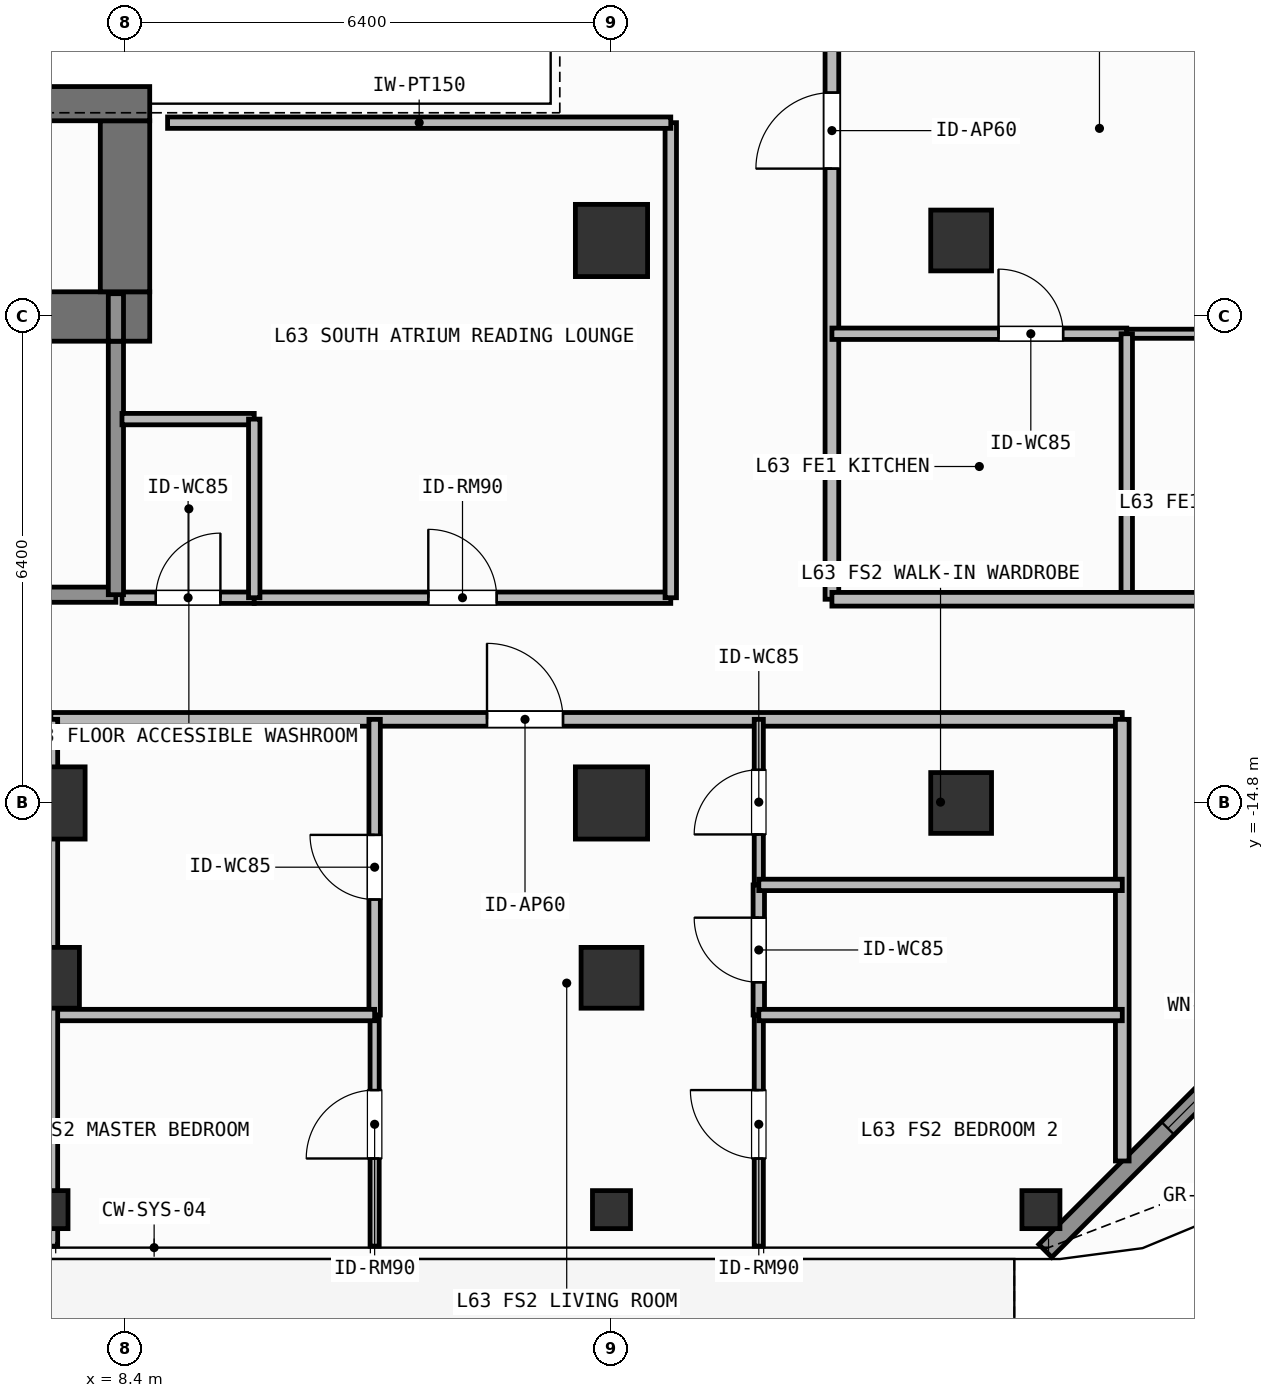
"""IFC4 building model, lengths in metres.
Left out: names, types, materials, properties, quantities, classifications, styles, units other than length and angle.
Written with IfcOpenShell. Run it as: python <this file> out.ifc"""

import sys

from ifc_helpers import new_model, si_unit, direction, frame, frame_2d, origin, origin_2d, place, context, subcontext, project, spatial, rectangle, hollow_rectangle, extrude, element, fill, save


model = new_model("IFC4")
c1 = context("Model", 3, precision=1e-05, world=origin(), true_north=direction((0.0, 1.0)))
c2 = subcontext(c1, "Body", "Model", "MODEL_VIEW")
j1 = project(units=[si_unit("LENGTHUNIT", "METRE"), si_unit("PLANEANGLEUNIT", "RADIAN")], contexts=[c1])
p1 = place(None, origin())
s1 = spatial("IfcSite", under=j1, at=p1, CompositionType="ELEMENT")
p2 = place(p1, origin())
s2 = spatial("IfcBuilding", under=s1, at=p2, CompositionType="ELEMENT")
p3 = place(p2, frame((0.0, 0.0, 258.6)))
s3 = spatial("IfcBuildingStorey", under=s2, at=p3, CompositionType="ELEMENT", Elevation=258.6)
p4 = place(p3, frame((6.12, -8.4, 0.0), z_axis=(0.0, 0.0, 1.0), x_axis=(1.0, 0.0, 0.0)))
e1 = element("IfcWall", 1, at=p4, inside=s3, PredefinedType="SHEAR", context=c2, shape_type="SweptSolid", body=[
    extrude(rectangle(XDim=2.605, YDim=0.65, at=frame_2d((1.302, 0.0))), origin(), (0.0, 0.0, 1.0), 3.9),
])
p5 = place(p3, frame((8.4, -8.075, 0.0), z_axis=(0.0, 0.0, 1.0), x_axis=(0.0, 1.0, 0.0)))
e2 = element("IfcWall", 2, at=p5, inside=s3, PredefinedType="SHEAR", context=c2, shape_type="SweptSolid", body=[
    extrude(rectangle(XDim=2.25, YDim=0.65, at=frame_2d((1.125, 0.0))), origin(), (0.0, 0.0, 1.0), 3.9),
])
p6 = place(p3, frame((3.045, -5.6, 0.0), z_axis=(0.0, 0.0, 1.0), x_axis=(1.0, 0.0, 0.0)))
e3 = element("IfcWall", 3, at=p6, inside=s3, PredefinedType="SHEAR", context=c2, shape_type="SweptSolid", body=[
    extrude(rectangle(XDim=5.68, YDim=0.45, at=frame_2d((2.84, 0.0))), origin(), (0.0, 0.0, 1.0), 3.9),
])
for number, where, z_axis, x_axis in (
    (4, (7.4, -14.8, 0.0), (0.0, 0.0, 1.0), (1.0, 0.0, 0.0)),
    (5, (14.8, -14.8, 0.0), (0.0, 0.0, 1.0), (1.0, 0.0, 0.0)),
    (6, (14.8, -7.4, 0.0), (0.0, 0.0, 1.0), (1.0, 0.0, 0.0)),
):
    element("IfcColumn", number, at=place(p3, frame(where, z_axis=z_axis, x_axis=x_axis)), inside=s3, PredefinedType="COLUMN", context=c2, shape_type="SweptSolid", body=[
        extrude(rectangle(XDim=0.95, YDim=0.95, at=origin_2d()), origin(), (0.0, 0.0, 1.0), 3.9),
    ])
for number, where, z_axis, x_axis in (
    (7, (19.4, -14.8, 0.0), (0.0, 0.0, 1.0), (1.0, 0.0, 0.0)),
    (8, (19.4, -7.4, 0.0), (0.0, 0.0, 1.0), (1.0, 0.0, 0.0)),
    (9, (7.4, -17.1, 0.0), (0.0, 0.0, 1.0), (1.0, 0.0, 0.0)),
    (10, (14.8, -17.1, 0.0), (0.0, 0.0, 1.0), (1.0, 0.0, 0.0)),
):
    element("IfcColumn", number, at=place(p3, frame(where, z_axis=z_axis, x_axis=x_axis)), inside=s3, PredefinedType="COLUMN", context=c2, shape_type="SweptSolid", body=[
        extrude(hollow_rectangle(XDim=0.8, YDim=0.8, WallThickness=0.036, at=origin_2d()), origin(), (0.0, 0.0, 1.0), 3.9),
    ])
for number, where, z_axis, x_axis in (
    (11, (20.45, -20.15, 0.0), (0.0, 0.0, 1.0), (1.0, 0.0, 0.0)),
    (12, (7.4, -20.15, 0.0), (0.0, 0.0, 1.0), (1.0, 0.0, 0.0)),
    (13, (14.8, -20.15, 0.0), (0.0, 0.0, 1.0), (1.0, 0.0, 0.0)),
):
    element("IfcColumn", number, at=place(p3, frame(where, z_axis=z_axis, x_axis=x_axis)), inside=s3, PredefinedType="COLUMN", context=c2, shape_type="SweptSolid", body=[
        extrude(hollow_rectangle(XDim=0.5, YDim=0.5, WallThickness=0.025, at=origin_2d()), origin(), (0.0, 0.0, 1.0), 3.9),
    ])
p7 = place(p3, frame((24.792, -16.408, 0.0), z_axis=(0.0, 0.0, 1.0), x_axis=(-0.707126925818, -0.707086635981, 0.0)))
e14 = element("IfcWall", 14, at=p7, inside=s3, PredefinedType="SOLIDWALL", context=c2, shape_type="SweptSolid", body=[
    extrude(rectangle(XDim=6.06, YDim=0.24, at=frame_2d((3.03, 0.0))), origin(), (0.0, 0.0, 1.0), 3.68),
])
p8 = place(p7, frame((2.28, 0.0, 0.8)))
e15 = element("IfcOpeningElement", 15, at=p8, cuts=e14, PredefinedType="OPENING", context=c2, shape_type="SweptSolid", body=[
    extrude(rectangle(XDim=1.5, YDim=1.85, at=frame_2d((0.75, 0.925))), frame((0.0, 0.13, 0.0), z_axis=(0.0, -1.0, 0.0), x_axis=(1.0, 0.0, 0.0)), (0.0, 0.0, 1.0), 0.26),
])
p9 = place(p3, frame((4.58, -12.06, 0.0), z_axis=(0.0, 0.0, 1.0), x_axis=(1.0, 0.0, 0.0)))
e16 = element("IfcWall", 16, at=p9, inside=s3, PredefinedType="SOLIDWALL", context=c2, shape_type="SweptSolid", body=[
    extrude(rectangle(XDim=3.7, YDim=0.2, at=frame_2d((1.85, 0.0))), origin(), (0.0, 0.0, 1.0), 3.68),
])
p10 = place(p9, frame((1.212, 0.0, 0.0)))
e17 = element("IfcOpeningElement", 17, at=p10, cuts=e16, PredefinedType="OPENING", context=c2, shape_type="SweptSolid", body=[
    extrude(rectangle(XDim=1.1, YDim=2.15, at=frame_2d((0.55, 1.075))), frame((0.0, 0.11, 0.0), z_axis=(0.0, -1.0, 0.0), x_axis=(1.0, 0.0, 0.0)), (0.0, 0.0, 1.0), 0.22),
])
p11 = place(p3, frame((8.36, -12.1, 0.0), z_axis=(0.0, 0.0, 1.0), x_axis=(1.0, 0.0, 0.0)))
e18 = element("IfcWall", 18, at=p11, inside=s3, PredefinedType="PARTITIONING", context=c2, shape_type="SweptSolid", body=[
    extrude(rectangle(XDim=1.74, YDim=0.15, at=frame_2d((0.87, 0.0))), origin(), (0.0, 0.0, 1.0), 3.68),
])
p12 = place(p11, frame((0.445, 0.0, 0.0)))
e19 = element("IfcOpeningElement", 19, at=p12, cuts=e18, PredefinedType="OPENING", context=c2, shape_type="SweptSolid", body=[
    extrude(rectangle(XDim=0.85, YDim=2.1, at=frame_2d((0.425, 1.05))), frame((0.0, 0.085, 0.0), z_axis=(0.0, -1.0, 0.0), x_axis=(1.0, 0.0, 0.0)), (0.0, 0.0, 1.0), 0.17),
])
p13 = place(p3, frame((10.1, -12.1, 0.0), z_axis=(0.0, 0.0, 1.0), x_axis=(1.0, 0.0, 0.0)))
e20 = element("IfcWall", 20, at=p13, inside=s3, PredefinedType="PARTITIONING", context=c2, shape_type="SweptSolid", body=[
    extrude(rectangle(XDim=5.48, YDim=0.15, at=frame_2d((2.74, 0.0))), origin(), (0.0, 0.0, 1.0), 3.68),
])
p14 = place(p13, frame((2.29, 0.0, 0.0)))
e21 = element("IfcOpeningElement", 21, at=p14, cuts=e20, PredefinedType="OPENING", context=c2, shape_type="SweptSolid", body=[
    extrude(rectangle(XDim=0.9, YDim=2.1, at=frame_2d((0.45, 1.05))), frame((0.0, 0.085, 0.0), z_axis=(0.0, -1.0, 0.0), x_axis=(1.0, 0.0, 0.0)), (0.0, 0.0, 1.0), 0.17),
])
p15 = place(p3, frame((7.424, -13.7, 0.0), z_axis=(0.0, 0.0, 1.0), x_axis=(1.0, 0.0, 0.0)))
e22 = element("IfcWall", 22, at=p15, inside=s3, PredefinedType="PARTITIONING", context=c2, shape_type="SweptSolid", body=[
    extrude(rectangle(XDim=14.096, YDim=0.18, at=frame_2d((7.048, 0.0))), origin(), (0.0, 0.0, 1.0), 3.68),
])
p16 = place(p15, frame((5.738, 0.0, 0.0)))
e23 = element("IfcOpeningElement", 23, at=p16, cuts=e22, PredefinedType="OPENING", context=c2, shape_type="SweptSolid", body=[
    extrude(rectangle(XDim=1.0, YDim=2.2, at=frame_2d((0.5, 1.1))), frame((0.0, 0.1, 0.0), z_axis=(0.0, -1.0, 0.0), x_axis=(1.0, 0.0, 0.0)), (0.0, 0.0, 1.0), 0.2),
])
p17 = place(p3, frame((11.684, -17.59, 0.0), z_axis=(0.0, 0.0, 1.0), x_axis=(0.0, 1.0, 0.0)))
e24 = element("IfcWall", 24, at=p17, inside=s3, PredefinedType="PARTITIONING", context=c2, shape_type="SweptSolid", body=[
    extrude(rectangle(XDim=3.89, YDim=0.15, at=frame_2d((1.945, 0.0))), origin(), (0.0, 0.0, 1.0), 3.68),
])
p18 = place(p17, frame((1.52, 0.0, 0.0)))
e25 = element("IfcOpeningElement", 25, at=p18, cuts=e24, PredefinedType="OPENING", context=c2, shape_type="SweptSolid", body=[
    extrude(rectangle(XDim=0.85, YDim=2.1, at=frame_2d((0.425, 1.05))), frame((0.0, 0.085, 0.0), z_axis=(0.0, -1.0, 0.0), x_axis=(1.0, 0.0, 0.0)), (0.0, 0.0, 1.0), 0.17),
])
p19 = place(p3, frame((11.684, -20.63, 0.0), z_axis=(0.0, 0.0, 1.0), x_axis=(0.0, 1.0, 0.0)))
e26 = element("IfcWall", 26, at=p19, inside=s3, PredefinedType="PARTITIONING", context=c2, shape_type="SweptSolid", body=[
    extrude(rectangle(XDim=3.04, YDim=0.12, at=frame_2d((1.52, 0.0))), origin(), (0.0, 0.0, 1.0), 3.68),
])
p20 = place(p19, frame((1.153, 0.0, 0.0)))
e27 = element("IfcOpeningElement", 27, at=p20, cuts=e26, PredefinedType="OPENING", context=c2, shape_type="SweptSolid", body=[
    extrude(rectangle(XDim=0.9, YDim=2.1, at=frame_2d((0.45, 1.05))), frame((0.0, 0.07, 0.0), z_axis=(0.0, -1.0, 0.0), x_axis=(1.0, 0.0, 0.0)), (0.0, 0.0, 1.0), 0.14),
])
p21 = place(p3, frame((16.738, -17.59, 0.0), z_axis=(0.0, 0.0, 1.0), x_axis=(0.0, 1.0, 0.0)))
e28 = element("IfcWall", 28, at=p21, inside=s3, PredefinedType="PARTITIONING", context=c2, shape_type="SweptSolid", body=[
    extrude(rectangle(XDim=1.712, YDim=0.15, at=frame_2d((0.856, 0.0))), origin(), (0.0, 0.0, 1.0), 3.68),
])
p22 = place(p21, frame((0.431, 0.0, 0.0)))
e29 = element("IfcOpeningElement", 29, at=p22, cuts=e28, PredefinedType="OPENING", context=c2, shape_type="SweptSolid", body=[
    extrude(rectangle(XDim=0.85, YDim=2.1, at=frame_2d((0.425, 1.05))), frame((0.0, 0.085, 0.0), z_axis=(0.0, -1.0, 0.0), x_axis=(1.0, 0.0, 0.0)), (0.0, 0.0, 1.0), 0.17),
])
p23 = place(p3, frame((16.738, -15.878, 0.0), z_axis=(0.0, 0.0, 1.0), x_axis=(0.0, 1.0, 0.0)))
e30 = element("IfcWall", 30, at=p23, inside=s3, PredefinedType="PARTITIONING", context=c2, shape_type="SweptSolid", body=[
    extrude(rectangle(XDim=2.178, YDim=0.12, at=frame_2d((1.089, 0.0))), origin(), (0.0, 0.0, 1.0), 3.68),
])
p24 = place(p23, frame((0.664, 0.0, 0.0)))
e31 = element("IfcOpeningElement", 31, at=p24, cuts=e30, PredefinedType="OPENING", context=c2, shape_type="SweptSolid", body=[
    extrude(rectangle(XDim=0.85, YDim=2.1, at=frame_2d((0.425, 1.05))), frame((0.0, 0.07, 0.0), z_axis=(0.0, -1.0, 0.0), x_axis=(1.0, 0.0, 0.0)), (0.0, 0.0, 1.0), 0.14),
])
p25 = place(p3, frame((16.738, -20.63, 0.0), z_axis=(0.0, 0.0, 1.0), x_axis=(0.0, 1.0, 0.0)))
e32 = element("IfcWall", 32, at=p25, inside=s3, PredefinedType="PARTITIONING", context=c2, shape_type="SweptSolid", body=[
    extrude(rectangle(XDim=3.04, YDim=0.12, at=frame_2d((1.52, 0.0))), origin(), (0.0, 0.0, 1.0), 3.68),
])
p26 = place(p25, frame((1.153, 0.0, 0.0)))
e33 = element("IfcOpeningElement", 33, at=p26, cuts=e32, PredefinedType="OPENING", context=c2, shape_type="SweptSolid", body=[
    extrude(rectangle(XDim=0.9, YDim=2.1, at=frame_2d((0.45, 1.05))), frame((0.0, 0.07, 0.0), z_axis=(0.0, -1.0, 0.0), x_axis=(1.0, 0.0, 0.0)), (0.0, 0.0, 1.0), 0.14),
])
p27 = place(p3, frame((17.7, -12.12, 0.0), z_axis=(0.0, 0.0, 1.0), x_axis=(0.0, 1.0, 0.0)))
e34 = element("IfcWall", 34, at=p27, inside=s3, PredefinedType="PARTITIONING", context=c2, shape_type="SweptSolid", body=[
    extrude(rectangle(XDim=13.574, YDim=0.18, at=frame_2d((6.787, 0.0))), origin(), (0.0, 0.0, 1.0), 3.68),
])
p28 = place(p27, frame((5.665, 0.0, 0.0)))
e35 = element("IfcOpeningElement", 35, at=p28, cuts=e34, PredefinedType="OPENING", context=c2, shape_type="SweptSolid", body=[
    extrude(rectangle(XDim=1.0, YDim=2.2, at=frame_2d((0.5, 1.1))), frame((0.0, 0.1, 0.0), z_axis=(0.0, -1.0, 0.0), x_axis=(1.0, 0.0, 0.0)), (0.0, 0.0, 1.0), 0.2),
])
p29 = place(p3, frame((17.7, -8.627, 0.0), z_axis=(0.0, 0.0, 1.0), x_axis=(1.0, 0.0, 0.0)))
e36 = element("IfcWall", 36, at=p29, inside=s3, PredefinedType="PARTITIONING", context=c2, shape_type="SweptSolid", body=[
    extrude(rectangle(XDim=3.879, YDim=0.15, at=frame_2d((1.939, 0.0))), origin(), (0.0, 0.0, 1.0), 3.68),
])
p30 = place(p29, frame((2.192, 0.0, 0.0)))
e37 = element("IfcOpeningElement", 37, at=p30, cuts=e36, PredefinedType="OPENING", context=c2, shape_type="SweptSolid", body=[
    extrude(rectangle(XDim=0.85, YDim=2.1, at=frame_2d((0.425, 1.05))), frame((0.0, 0.085, 0.0), z_axis=(0.0, -1.0, 0.0), x_axis=(1.0, 0.0, 0.0)), (0.0, 0.0, 1.0), 0.17),
])
p31 = place(p3, frame((21.579, -8.627, 0.0), z_axis=(0.0, 0.0, 1.0), x_axis=(1.0, 0.0, 0.0)))
e38 = element("IfcWall", 38, at=p31, inside=s3, PredefinedType="PARTITIONING", context=c2, shape_type="SweptSolid", body=[
    extrude(rectangle(XDim=3.151, YDim=0.12, at=frame_2d((1.575, 0.0))), origin(), (0.0, 0.0, 1.0), 3.68),
])
p32 = place(p31, frame((1.213, 0.0, 0.0)))
e39 = element("IfcOpeningElement", 39, at=p32, cuts=e38, PredefinedType="OPENING", context=c2, shape_type="SweptSolid", body=[
    extrude(rectangle(XDim=0.9, YDim=2.1, at=frame_2d((0.45, 1.05))), frame((0.0, 0.07, 0.0), z_axis=(0.0, -1.0, 0.0), x_axis=(1.0, 0.0, 0.0)), (0.0, 0.0, 1.0), 0.14),
])
p33 = place(p3, frame((8.28, -12.06, 0.0), z_axis=(0.0, 0.0, 1.0), x_axis=(0.0, 1.0, 0.0)))
e40 = element("IfcWall", 40, at=p33, inside=s3, PredefinedType="SOLIDWALL", context=c2, shape_type="SweptSolid", body=[
    extrude(rectangle(XDim=3.335, YDim=0.2, at=frame_2d((1.667, 0.0))), origin(), (0.0, 0.0, 1.0), 3.68),
])
p34 = place(p3, frame((8.28, -8.725, 0.0), z_axis=(0.0, 0.0, 1.0), x_axis=(0.0, 1.0, 0.0)))
e41 = element("IfcWall", 41, at=p34, inside=s3, PredefinedType="SOLIDWALL", context=c2, shape_type="SweptSolid", body=[
    extrude(rectangle(XDim=0.625, YDim=0.2, at=frame_2d((0.312, 0.0))), origin(), (0.0, 0.0, 1.0), 3.68),
])
p35 = place(p3, frame((8.36, -9.75, 0.0), z_axis=(0.0, 0.0, 1.0), x_axis=(1.0, 0.0, 0.0)))
e42 = element("IfcWall", 42, at=p35, inside=s3, PredefinedType="PARTITIONING", context=c2, shape_type="SweptSolid", body=[
    extrude(rectangle(XDim=1.74, YDim=0.15, at=frame_2d((0.87, 0.0))), origin(), (0.0, 0.0, 1.0), 3.68),
])
p36 = place(p3, frame((10.1, -12.1, 0.0), z_axis=(0.0, 0.0, 1.0), x_axis=(0.0, 1.0, 0.0)))
e43 = element("IfcWall", 43, at=p36, inside=s3, PredefinedType="PARTITIONING", context=c2, shape_type="SweptSolid", body=[
    extrude(rectangle(XDim=2.35, YDim=0.15, at=frame_2d((1.175, 0.0))), origin(), (0.0, 0.0, 1.0), 3.68),
])
p37 = place(p3, frame((15.58, -12.1, 0.0), z_axis=(0.0, 0.0, 1.0), x_axis=(0.0, 1.0, 0.0)))
e44 = element("IfcWall", 44, at=p37, inside=s3, PredefinedType="PARTITIONING", context=c2, shape_type="SweptSolid", body=[
    extrude(rectangle(XDim=6.25, YDim=0.15, at=frame_2d((3.125, 0.0))), origin(), (0.0, 0.0, 1.0), 3.68),
])
p38 = place(p3, frame((8.96, -5.85, 0.0), z_axis=(0.0, 0.0, 1.0), x_axis=(1.0, 0.0, 0.0)))
e45 = element("IfcWall", 45, at=p38, inside=s3, PredefinedType="PARTITIONING", context=c2, shape_type="SweptSolid", body=[
    extrude(rectangle(XDim=6.62, YDim=0.15, at=frame_2d((3.31, 0.0))), origin(), (0.0, 0.0, 1.0), 3.68),
])
p39 = place(p3, frame((21.52, -19.51, 0.0), z_axis=(0.0, 0.0, 1.0), x_axis=(0.0, 1.0, 0.0)))
e46 = element("IfcWall", 46, at=p39, inside=s3, PredefinedType="PARTITIONING", context=c2, shape_type="SweptSolid", body=[
    extrude(rectangle(XDim=5.81, YDim=0.18, at=frame_2d((2.905, 0.0))), origin(), (0.0, 0.0, 1.0), 3.68),
])
p40 = place(p3, frame((7.424, -17.59, 0.0), z_axis=(0.0, 0.0, 1.0), x_axis=(1.0, 0.0, 0.0)))
e47 = element("IfcWall", 47, at=p40, inside=s3, PredefinedType="PARTITIONING", context=c2, shape_type="SweptSolid", body=[
    extrude(rectangle(XDim=4.26, YDim=0.15, at=frame_2d((2.13, 0.0))), origin(), (0.0, 0.0, 1.0), 3.68),
])
for number, where, z_axis, x_axis in (
    (48, (16.738, -15.878, 0.0), (0.0, 0.0, 1.0), (1.0, 0.0, 0.0)),
    (49, (16.738, -17.59, 0.0), (0.0, 0.0, 1.0), (1.0, 0.0, 0.0)),
):
    element("IfcWall", number, at=place(p3, frame(where, z_axis=z_axis, x_axis=x_axis)), inside=s3, PredefinedType="PARTITIONING", context=c2, shape_type="SweptSolid", body=[
        extrude(rectangle(XDim=4.782, YDim=0.15, at=frame_2d((2.391, 0.0))), origin(), (0.0, 0.0, 1.0), 3.68),
    ])
p41 = place(p3, frame((7.424, -20.63, 0.0), z_axis=(0.0, 0.0, 1.0), x_axis=(0.0, 1.0, 0.0)))
e50 = element("IfcWall", 50, at=p41, inside=s3, PredefinedType="PARTITIONING", context=c2, shape_type="SweptSolid", body=[
    extrude(rectangle(XDim=6.93, YDim=0.18, at=frame_2d((3.465, 0.0))), origin(), (0.0, 0.0, 1.0), 3.182),
])
p42 = place(p3, frame((21.579, -12.12, 0.0), z_axis=(0.0, 0.0, 1.0), x_axis=(0.0, 1.0, 0.0)))
e51 = element("IfcWall", 51, at=p42, inside=s3, PredefinedType="PARTITIONING", context=c2, shape_type="SweptSolid", body=[
    extrude(rectangle(XDim=3.493, YDim=0.15, at=frame_2d((1.747, 0.0))), origin(), (0.0, 0.0, 1.0), 3.68),
])
p43 = place(p3, frame((17.7, -12.12, 0.0), z_axis=(0.0, 0.0, 1.0), x_axis=(1.0, 0.0, 0.0)))
e52 = element("IfcWall", 52, at=p43, inside=s3, PredefinedType="PARTITIONING", context=c2, shape_type="SweptSolid", body=[
    extrude(rectangle(XDim=7.03, YDim=0.18, at=frame_2d((3.515, 0.0))), origin(), (0.0, 0.0, 1.0), 3.68),
])
p44 = place(p8, origin())
e53 = element("IfcWindow", 53, at=p44, inside=s3, PartitioningType="SINGLE_PANEL", PredefinedType="WINDOW", context=c2, shape_type="SweptSolid", body=[
    extrude(rectangle(XDim=1.5, YDim=1.85, at=frame_2d((0.75, 0.925))), frame((0.0, 0.03, 0.0), z_axis=(0.0, -1.0, 0.0), x_axis=(1.0, 0.0, 0.0)), (0.0, 0.0, 1.0), 0.06),
])
fill(e15, e53)
p45 = place(p12, origin())
e54 = element("IfcDoor", 54, at=p45, inside=s3, OperationType="SINGLE_SWING_RIGHT", PredefinedType="DOOR", context=c2, shape_type="SweptSolid", body=[
    extrude(rectangle(XDim=0.85, YDim=2.1, at=frame_2d((0.425, 1.05))), frame((0.0, 0.025, 0.0), z_axis=(0.0, -1.0, 0.0), x_axis=(1.0, 0.0, 0.0)), (0.0, 0.0, 1.0), 0.05),
])
fill(e19, e54)
p46 = place(p14, origin())
e55 = element("IfcDoor", 55, at=p46, inside=s3, OperationType="SINGLE_SWING_LEFT", PredefinedType="DOOR", context=c2, shape_type="SweptSolid", body=[
    extrude(rectangle(XDim=0.9, YDim=2.1, at=frame_2d((0.45, 1.05))), frame((0.0, 0.025, 0.0), z_axis=(0.0, -1.0, 0.0), x_axis=(1.0, 0.0, 0.0)), (0.0, 0.0, 1.0), 0.05),
])
fill(e21, e55)
p47 = place(p16, origin())
e56 = element("IfcDoor", 56, at=p47, inside=s3, OperationType="SINGLE_SWING_LEFT", PredefinedType="DOOR", context=c2, shape_type="SweptSolid", body=[
    extrude(rectangle(XDim=1.0, YDim=2.2, at=frame_2d((0.5, 1.1))), frame((0.0, 0.025, 0.0), z_axis=(0.0, -1.0, 0.0), x_axis=(1.0, 0.0, 0.0)), (0.0, 0.0, 1.0), 0.05),
])
fill(e23, e56)
p48 = place(p18, origin())
e57 = element("IfcDoor", 57, at=p48, inside=s3, OperationType="SINGLE_SWING_RIGHT", PredefinedType="DOOR", context=c2, shape_type="SweptSolid", body=[
    extrude(rectangle(XDim=0.85, YDim=2.1, at=frame_2d((0.425, 1.05))), frame((0.0, 0.025, 0.0), z_axis=(0.0, -1.0, 0.0), x_axis=(1.0, 0.0, 0.0)), (0.0, 0.0, 1.0), 0.05),
])
fill(e25, e57)
p49 = place(p20, origin())
e58 = element("IfcDoor", 58, at=p49, inside=s3, OperationType="SINGLE_SWING_LEFT", PredefinedType="DOOR", context=c2, shape_type="SweptSolid", body=[
    extrude(rectangle(XDim=0.9, YDim=2.1, at=frame_2d((0.45, 1.05))), frame((0.0, 0.025, 0.0), z_axis=(0.0, -1.0, 0.0), x_axis=(1.0, 0.0, 0.0)), (0.0, 0.0, 1.0), 0.05),
])
fill(e27, e58)
p50 = place(p22, origin())
e59 = element("IfcDoor", 59, at=p50, inside=s3, OperationType="SINGLE_SWING_RIGHT", PredefinedType="DOOR", context=c2, shape_type="SweptSolid", body=[
    extrude(rectangle(XDim=0.85, YDim=2.1, at=frame_2d((0.425, 1.05))), frame((0.0, 0.025, 0.0), z_axis=(0.0, -1.0, 0.0), x_axis=(1.0, 0.0, 0.0)), (0.0, 0.0, 1.0), 0.05),
])
fill(e29, e59)
p51 = place(p24, origin())
e60 = element("IfcDoor", 60, at=p51, inside=s3, OperationType="SINGLE_SWING_LEFT", PredefinedType="DOOR", context=c2, shape_type="SweptSolid", body=[
    extrude(rectangle(XDim=0.85, YDim=2.1, at=frame_2d((0.425, 1.05))), frame((0.0, 0.025, 0.0), z_axis=(0.0, -1.0, 0.0), x_axis=(1.0, 0.0, 0.0)), (0.0, 0.0, 1.0), 0.05),
])
fill(e31, e60)
p52 = place(p26, origin())
e61 = element("IfcDoor", 61, at=p52, inside=s3, OperationType="SINGLE_SWING_RIGHT", PredefinedType="DOOR", context=c2, shape_type="SweptSolid", body=[
    extrude(rectangle(XDim=0.9, YDim=2.1, at=frame_2d((0.45, 1.05))), frame((0.0, 0.025, 0.0), z_axis=(0.0, -1.0, 0.0), x_axis=(1.0, 0.0, 0.0)), (0.0, 0.0, 1.0), 0.05),
])
fill(e33, e61)
p53 = place(p28, origin())
e62 = element("IfcDoor", 62, at=p53, inside=s3, OperationType="SINGLE_SWING_LEFT", PredefinedType="DOOR", context=c2, shape_type="SweptSolid", body=[
    extrude(rectangle(XDim=1.0, YDim=2.2, at=frame_2d((0.5, 1.1))), frame((0.0, 0.025, 0.0), z_axis=(0.0, -1.0, 0.0), x_axis=(1.0, 0.0, 0.0)), (0.0, 0.0, 1.0), 0.05),
])
fill(e35, e62)
p54 = place(p30, origin())
e63 = element("IfcDoor", 63, at=p54, inside=s3, OperationType="SINGLE_SWING_LEFT", PredefinedType="DOOR", context=c2, shape_type="SweptSolid", body=[
    extrude(rectangle(XDim=0.85, YDim=2.1, at=frame_2d((0.425, 1.05))), frame((0.0, 0.025, 0.0), z_axis=(0.0, -1.0, 0.0), x_axis=(1.0, 0.0, 0.0)), (0.0, 0.0, 1.0), 0.05),
])
fill(e37, e63)
save(model, sys.argv[1])
